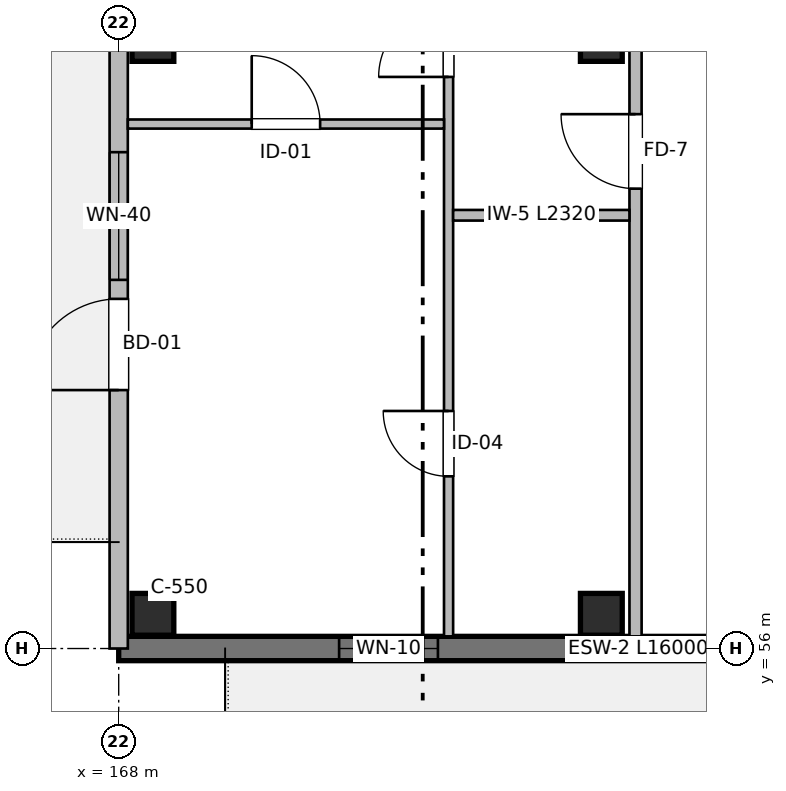
"""IFC4 building model, lengths in metres.
Left out: names, types, materials, properties, quantities, classifications, styles, units other than length and angle.
Written with IfcOpenShell. Run it as: python <this file> out.ifc"""

import sys

from ifc_helpers import new_model, si_unit, direction, frame, frame_2d, origin, origin_2d, place, context, subcontext, project, spatial, rectangle, extrude, element, fill, save


model = new_model("IFC4")
c1 = context("Model", 3, precision=1e-05, world=origin(), true_north=direction((0.0, 1.0)))
c2 = subcontext(c1, "Body", "Model", "MODEL_VIEW")
j1 = project(units=[si_unit("LENGTHUNIT", "METRE"), si_unit("PLANEANGLEUNIT", "RADIAN")], contexts=[c1])
p1 = place(None, origin())
s1 = spatial("IfcSite", under=j1, at=p1, CompositionType="ELEMENT")
p2 = place(p1, origin())
s2 = spatial("IfcBuilding", under=s1, at=p2, CompositionType="ELEMENT")
p3 = place(p2, frame((0.0, 0.0, 26.56)))
s3 = spatial("IfcBuildingStorey", under=s2, at=p3, CompositionType="ELEMENT", Elevation=26.56)
for number, where, z_axis, x_axis in (
    (1, (168.45, 56.45, 0.0), (0.0, 0.0, 1.0), (1.0, 0.0, 0.0)),
    (2, (168.45, 64.0, 0.0), (0.0, 0.0, 1.0), (1.0, 0.0, 0.0)),
    (3, (174.35, 56.45, 0.0), (0.0, 0.0, 1.0), (1.0, 0.0, 0.0)),
    (4, (174.35, 64.0, 0.0), (0.0, 0.0, 1.0), (1.0, 0.0, 0.0)),
):
    element("IfcColumn", number, at=place(p3, frame(where, z_axis=z_axis, x_axis=x_axis)), inside=s3, PredefinedType="COLUMN", context=c2, shape_type="SweptSolid", body=[
        extrude(rectangle(XDim=0.55, YDim=0.55, at=origin_2d()), origin(), (0.0, 0.0, 1.0), 3.2),
    ])
p4 = place(p3, frame((184.0, 56.0, 0.0), z_axis=(0.0, 0.0, 1.0), x_axis=(-1.0, 0.0, 0.0)))
e5 = element("IfcWall", 5, at=p4, inside=s3, PredefinedType="SHEAR", context=c2, shape_type="SweptSolid", body=[
    extrude(rectangle(XDim=16.0, YDim=0.32, at=frame_2d((8.0, 0.0))), origin(), (0.0, 0.0, 1.0), 2.98),
])
p5 = place(p4, frame((3.4, 0.0, 0.0)))
e6 = element("IfcOpeningElement", 6, at=p5, cuts=e5, PredefinedType="OPENING", context=c2, shape_type="SweptSolid", body=[
    extrude(rectangle(XDim=1.2, YDim=2.2, at=frame_2d((0.6, 1.1))), frame((0.0, 0.17, 0.0), z_axis=(0.0, -1.0, 0.0), x_axis=(1.0, 0.0, 0.0)), (0.0, 0.0, 1.0), 0.34),
])
p6 = place(p4, frame((4.85, 0.0, 0.72)))
e7 = element("IfcOpeningElement", 7, at=p6, cuts=e5, PredefinedType="OPENING", context=c2, shape_type="SweptSolid", body=[
    extrude(rectangle(XDim=1.68, YDim=1.5, at=frame_2d((0.84, 0.75))), frame((0.0, 0.17, 0.0), z_axis=(0.0, -1.0, 0.0), x_axis=(1.0, 0.0, 0.0)), (0.0, 0.0, 1.0), 0.34),
])
p7 = place(p4, frame((11.8, 0.0, 0.82)))
e8 = element("IfcOpeningElement", 8, at=p7, cuts=e5, PredefinedType="OPENING", context=c2, shape_type="SweptSolid", body=[
    extrude(rectangle(XDim=1.3, YDim=1.4, at=frame_2d((0.65, 0.7))), frame((0.0, 0.17, 0.0), z_axis=(0.0, -1.0, 0.0), x_axis=(1.0, 0.0, 0.0)), (0.0, 0.0, 1.0), 0.34),
])
p8 = place(p3, frame((168.0, 56.0, 0.0), z_axis=(0.0, 0.0, 1.0), x_axis=(0.0, 1.0, 0.0)))
e9 = element("IfcWall", 9, at=p8, inside=s3, PredefinedType="SOLIDWALL", context=c2, shape_type="SweptSolid", body=[
    extrude(rectangle(XDim=32.0, YDim=0.24, at=frame_2d((16.0, 0.0))), origin(), (0.0, 0.0, 1.0), 2.98),
])
p9 = place(p8, frame((3.4, 0.0, 0.0)))
e10 = element("IfcOpeningElement", 10, at=p9, cuts=e9, PredefinedType="OPENING", context=c2, shape_type="SweptSolid", body=[
    extrude(rectangle(XDim=1.2, YDim=2.2, at=frame_2d((0.6, 1.1))), frame((0.0, 0.13, 0.0), z_axis=(0.0, -1.0, 0.0), x_axis=(1.0, 0.0, 0.0)), (0.0, 0.0, 1.0), 0.26),
])
p10 = place(p8, frame((4.85, 0.0, 0.72)))
e11 = element("IfcOpeningElement", 11, at=p10, cuts=e9, PredefinedType="OPENING", context=c2, shape_type="SweptSolid", body=[
    extrude(rectangle(XDim=1.68, YDim=1.5, at=frame_2d((0.84, 0.75))), frame((0.0, 0.13, 0.0), z_axis=(0.0, -1.0, 0.0), x_axis=(1.0, 0.0, 0.0)), (0.0, 0.0, 1.0), 0.26),
])
p11 = place(p8, frame((10.5, 0.0, 0.82)))
e12 = element("IfcOpeningElement", 12, at=p11, cuts=e9, PredefinedType="OPENING", context=c2, shape_type="SweptSolid", body=[
    extrude(rectangle(XDim=1.3, YDim=1.4, at=frame_2d((0.65, 0.7))), frame((0.0, 0.13, 0.0), z_axis=(0.0, -1.0, 0.0), x_axis=(1.0, 0.0, 0.0)), (0.0, 0.0, 1.0), 0.26),
])
p12 = place(p8, frame((18.95, 0.0, 0.67)))
e13 = element("IfcOpeningElement", 13, at=p12, cuts=e9, PredefinedType="OPENING", context=c2, shape_type="SweptSolid", body=[
    extrude(rectangle(XDim=2.1, YDim=1.55, at=frame_2d((1.05, 0.775))), frame((0.0, 0.13, 0.0), z_axis=(0.0, -1.0, 0.0), x_axis=(1.0, 0.0, 0.0)), (0.0, 0.0, 1.0), 0.26),
])
p13 = place(p8, frame((26.875, 0.0, 0.72)))
e14 = element("IfcOpeningElement", 14, at=p13, cuts=e9, PredefinedType="OPENING", context=c2, shape_type="SweptSolid", body=[
    extrude(rectangle(XDim=2.25, YDim=1.5, at=frame_2d((1.125, 0.75))), frame((0.0, 0.13, 0.0), z_axis=(0.0, -1.0, 0.0), x_axis=(1.0, 0.0, 0.0)), (0.0, 0.0, 1.0), 0.26),
])
p14 = place(p8, frame((13.77, 0.0, 0.82)))
e15 = element("IfcOpeningElement", 15, at=p14, cuts=e9, PredefinedType="OPENING", context=c2, shape_type="SweptSolid", body=[
    extrude(rectangle(XDim=1.5, YDim=1.4, at=frame_2d((0.75, 0.7))), frame((0.0, 0.13, 0.0), z_axis=(0.0, -1.0, 0.0), x_axis=(1.0, 0.0, 0.0)), (0.0, 0.0, 1.0), 0.26),
])
p15 = place(p8, frame((23.61, 0.0, 0.82)))
e16 = element("IfcOpeningElement", 16, at=p15, cuts=e9, PredefinedType="OPENING", context=c2, shape_type="SweptSolid", body=[
    extrude(rectangle(XDim=1.5, YDim=1.4, at=frame_2d((0.75, 0.7))), frame((0.0, 0.13, 0.0), z_axis=(0.0, -1.0, 0.0), x_axis=(1.0, 0.0, 0.0)), (0.0, 0.0, 1.0), 0.26),
])
p16 = place(p8, frame((30.89, 0.0, 0.9)))
e17 = element("IfcOpeningElement", 17, at=p16, cuts=e9, PredefinedType="OPENING", context=c2, shape_type="SweptSolid", body=[
    extrude(rectangle(XDim=0.65, YDim=0.95, at=frame_2d((0.325, 0.475))), frame((0.0, 0.13, 0.0), z_axis=(0.0, -1.0, 0.0), x_axis=(1.0, 0.0, 0.0)), (0.0, 0.0, 1.0), 0.26),
])
p17 = place(p3, frame((174.8, 56.16, 0.0), z_axis=(0.0, 0.0, 1.0), x_axis=(0.0, 1.0, 0.0)))
e18 = element("IfcWall", 18, at=p17, inside=s3, PredefinedType="PARTITIONING", context=c2, shape_type="SweptSolid", body=[
    extrude(rectangle(XDim=50.64, YDim=0.16, at=frame_2d((25.32, 0.0))), origin(), (0.0, 0.0, 1.0), 2.935),
])
p18 = place(p17, frame((5.89, 0.0, 0.0)))
e19 = element("IfcOpeningElement", 19, at=p18, cuts=e18, PredefinedType="OPENING", context=c2, shape_type="SweptSolid", body=[
    extrude(rectangle(XDim=0.98, YDim=2.15, at=frame_2d((0.49, 1.075))), frame((0.0, 0.09, 0.0), z_axis=(0.0, -1.0, 0.0), x_axis=(1.0, 0.0, 0.0)), (0.0, 0.0, 1.0), 0.18),
])
p19 = place(p17, frame((19.4, 0.0, 0.0)))
e20 = element("IfcOpeningElement", 20, at=p19, cuts=e18, PredefinedType="OPENING", context=c2, shape_type="SweptSolid", body=[
    extrude(rectangle(XDim=0.98, YDim=2.15, at=frame_2d((0.49, 1.075))), frame((0.0, 0.09, 0.0), z_axis=(0.0, -1.0, 0.0), x_axis=(1.0, 0.0, 0.0)), (0.0, 0.0, 1.0), 0.18),
])
p20 = place(p17, frame((33.1, 0.0, 0.0)))
e21 = element("IfcOpeningElement", 21, at=p20, cuts=e18, PredefinedType="OPENING", context=c2, shape_type="SweptSolid", body=[
    extrude(rectangle(XDim=0.98, YDim=2.15, at=frame_2d((0.49, 1.075))), frame((0.0, 0.09, 0.0), z_axis=(0.0, -1.0, 0.0), x_axis=(1.0, 0.0, 0.0)), (0.0, 0.0, 1.0), 0.18),
])
p21 = place(p17, frame((45.35, 0.0, 0.0)))
e22 = element("IfcOpeningElement", 22, at=p21, cuts=e18, PredefinedType="OPENING", context=c2, shape_type="SweptSolid", body=[
    extrude(rectangle(XDim=0.98, YDim=2.15, at=frame_2d((0.49, 1.075))), frame((0.0, 0.09, 0.0), z_axis=(0.0, -1.0, 0.0), x_axis=(1.0, 0.0, 0.0)), (0.0, 0.0, 1.0), 0.18),
])
p22 = place(p3, frame((172.34, 56.16, 0.0), z_axis=(0.0, 0.0, 1.0), x_axis=(0.0, 1.0, 0.0)))
e23 = element("IfcWall", 23, at=p22, inside=s3, PredefinedType="PARTITIONING", context=c2, shape_type="SweptSolid", body=[
    extrude(rectangle(XDim=12.04, YDim=0.12, at=frame_2d((6.02, 0.0))), origin(), (0.0, 0.0, 1.0), 2.935),
])
p23 = place(p22, frame((2.105, 0.0, 0.0)))
e24 = element("IfcOpeningElement", 24, at=p23, cuts=e23, PredefinedType="OPENING", context=c2, shape_type="SweptSolid", body=[
    extrude(rectangle(XDim=0.86, YDim=2.1, at=frame_2d((0.43, 1.05))), frame((0.0, 0.07, 0.0), z_axis=(0.0, -1.0, 0.0), x_axis=(1.0, 0.0, 0.0)), (0.0, 0.0, 1.0), 0.14),
])
p24 = place(p22, frame((7.36, 0.0, 0.0)))
e25 = element("IfcOpeningElement", 25, at=p24, cuts=e23, PredefinedType="OPENING", context=c2, shape_type="SweptSolid", body=[
    extrude(rectangle(XDim=0.92, YDim=2.1, at=frame_2d((0.46, 1.05))), frame((0.0, 0.07, 0.0), z_axis=(0.0, -1.0, 0.0), x_axis=(1.0, 0.0, 0.0)), (0.0, 0.0, 1.0), 0.14),
])
p25 = place(p3, frame((172.4, 61.7, 0.0), z_axis=(0.0, 0.0, 1.0), x_axis=(1.0, 0.0, 0.0)))
e26 = element("IfcWall", 26, at=p25, inside=s3, PredefinedType="PARTITIONING", context=c2, shape_type="SweptSolid", body=[
    extrude(rectangle(XDim=2.32, YDim=0.14, at=frame_2d((1.16, 0.0))), origin(), (0.0, 0.0, 1.0), 2.935),
])
p26 = place(p3, frame((168.12, 62.9, 0.0), z_axis=(0.0, 0.0, 1.0), x_axis=(1.0, 0.0, 0.0)))
e27 = element("IfcWall", 27, at=p26, inside=s3, PredefinedType="PARTITIONING", context=c2, shape_type="SweptSolid", body=[
    extrude(rectangle(XDim=4.16, YDim=0.12, at=frame_2d((2.08, 0.0))), origin(), (0.0, 0.0, 1.0), 2.935),
])
p27 = place(p26, frame((1.63, 0.0, 0.0)))
e28 = element("IfcOpeningElement", 28, at=p27, cuts=e27, PredefinedType="OPENING", context=c2, shape_type="SweptSolid", body=[
    extrude(rectangle(XDim=0.9, YDim=2.1, at=frame_2d((0.45, 1.05))), frame((0.0, 0.07, 0.0), z_axis=(0.0, -1.0, 0.0), x_axis=(1.0, 0.0, 0.0)), (0.0, 0.0, 1.0), 0.14),
])
p28 = place(p7, origin())
e29 = element("IfcWindow", 29, at=p28, inside=s3, PartitioningType="SINGLE_PANEL", PredefinedType="WINDOW", context=c2, shape_type="SweptSolid", body=[
    extrude(rectangle(XDim=1.3, YDim=1.4, at=frame_2d((0.65, 0.7))), frame((0.0, 0.03, 0.0), z_axis=(0.0, -1.0, 0.0), x_axis=(1.0, 0.0, 0.0)), (0.0, 0.0, 1.0), 0.06),
])
fill(e8, e29)
p29 = place(p9, origin())
e30 = element("IfcDoor", 30, at=p29, inside=s3, OperationType="SINGLE_SWING_LEFT", PredefinedType="DOOR", context=c2, shape_type="SweptSolid", body=[
    extrude(rectangle(XDim=1.2, YDim=2.2, at=frame_2d((0.6, 1.1))), frame((0.0, 0.025, 0.0), z_axis=(0.0, -1.0, 0.0), x_axis=(1.0, 0.0, 0.0)), (0.0, 0.0, 1.0), 0.05),
])
fill(e10, e30)
p30 = place(p10, origin())
e31 = element("IfcWindow", 31, at=p30, inside=s3, PartitioningType="SINGLE_PANEL", PredefinedType="WINDOW", context=c2, shape_type="SweptSolid", body=[
    extrude(rectangle(XDim=1.68, YDim=1.5, at=frame_2d((0.84, 0.75))), frame((0.0, 0.03, 0.0), z_axis=(0.0, -1.0, 0.0), x_axis=(1.0, 0.0, 0.0)), (0.0, 0.0, 1.0), 0.06),
])
fill(e11, e31)
p31 = place(p23, origin())
e32 = element("IfcDoor", 32, at=p31, inside=s3, OperationType="SINGLE_SWING_RIGHT", PredefinedType="DOOR", context=c2, shape_type="SweptSolid", body=[
    extrude(rectangle(XDim=0.86, YDim=2.1, at=frame_2d((0.43, 1.05))), frame((0.0, 0.025, 0.0), z_axis=(0.0, -1.0, 0.0), x_axis=(1.0, 0.0, 0.0)), (0.0, 0.0, 1.0), 0.05),
])
fill(e24, e32)
p32 = place(p24, origin())
e33 = element("IfcDoor", 33, at=p32, inside=s3, OperationType="SINGLE_SWING_LEFT", PredefinedType="DOOR", context=c2, shape_type="SweptSolid", body=[
    extrude(rectangle(XDim=0.92, YDim=2.1, at=frame_2d((0.46, 1.05))), frame((0.0, 0.025, 0.0), z_axis=(0.0, -1.0, 0.0), x_axis=(1.0, 0.0, 0.0)), (0.0, 0.0, 1.0), 0.05),
])
fill(e25, e33)
p33 = place(p18, origin())
e34 = element("IfcDoor", 34, at=p33, inside=s3, OperationType="SINGLE_SWING_RIGHT", PredefinedType="DOOR", context=c2, shape_type="SweptSolid", body=[
    extrude(rectangle(XDim=0.98, YDim=2.15, at=frame_2d((0.49, 1.075))), frame((0.0, 0.025, 0.0), z_axis=(0.0, -1.0, 0.0), x_axis=(1.0, 0.0, 0.0)), (0.0, 0.0, 1.0), 0.05),
])
fill(e19, e34)
p34 = place(p27, origin())
e35 = element("IfcDoor", 35, at=p34, inside=s3, OperationType="SINGLE_SWING_LEFT", PredefinedType="DOOR", context=c2, shape_type="SweptSolid", body=[
    extrude(rectangle(XDim=0.9, YDim=2.1, at=frame_2d((0.45, 1.05))), frame((0.0, 0.025, 0.0), z_axis=(0.0, -1.0, 0.0), x_axis=(1.0, 0.0, 0.0)), (0.0, 0.0, 1.0), 0.05),
])
fill(e28, e35)
save(model, sys.argv[1])
